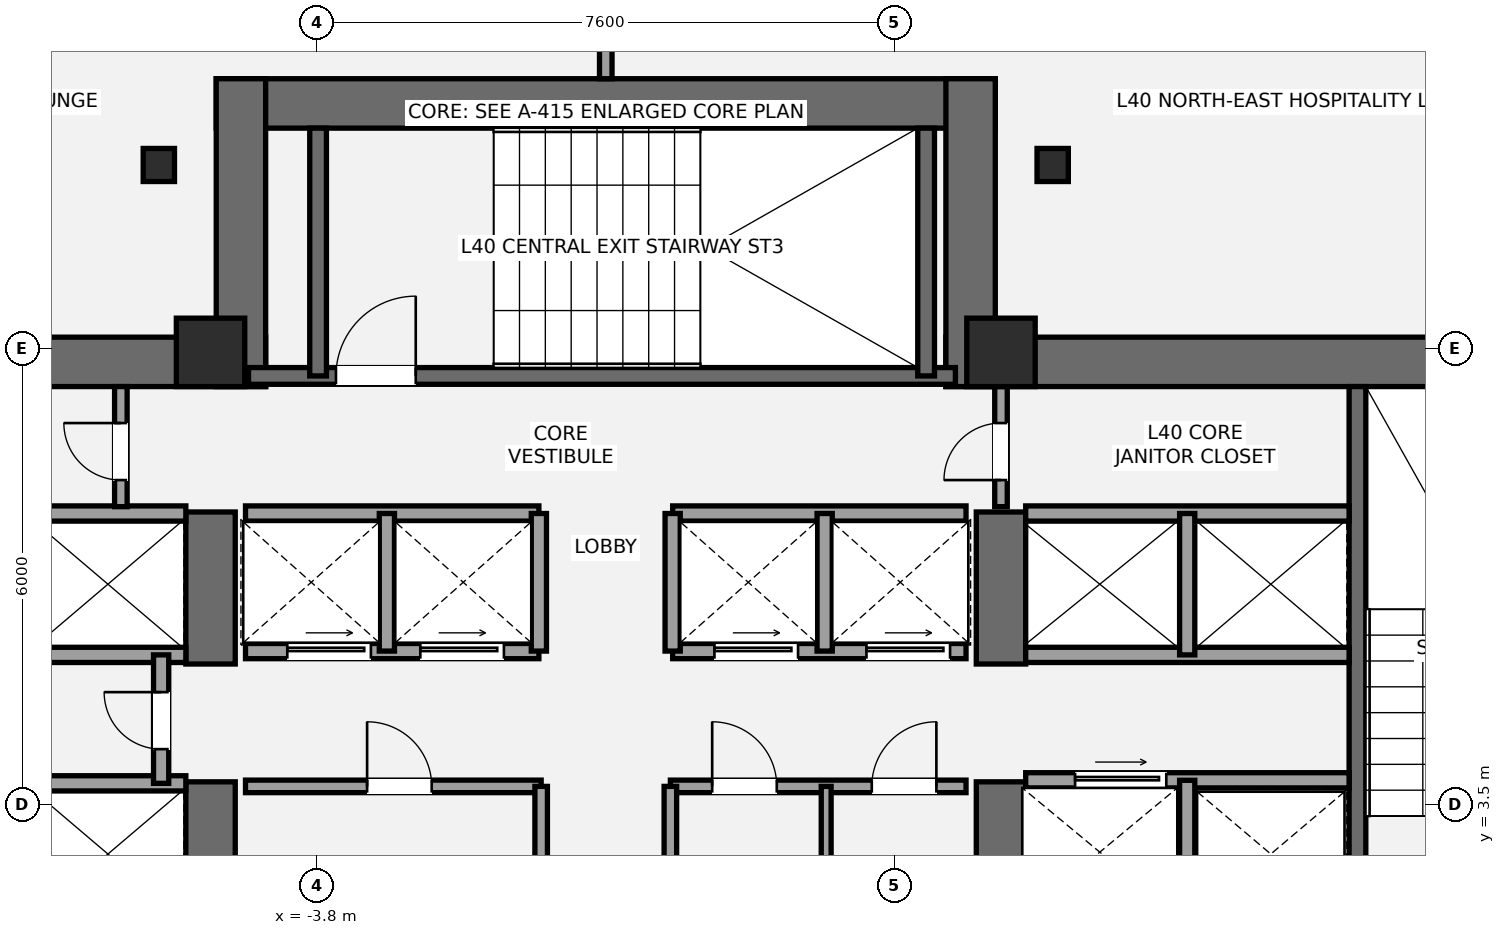
"""IFC4 building model, lengths in metres.
Left out: names, types, materials, properties, quantities, classifications, styles, units other than length and angle.
Written with IfcOpenShell. Run it as: python <this file> out.ifc"""

import sys

from ifc_helpers import new_model, si_unit, direction, frame, frame_2d, origin, origin_2d, place, context, subcontext, project, spatial, rectangle, i_section, extrude, element, fill, save


model = new_model("IFC4")
c1 = context("Model", 3, precision=1e-05, world=origin(), true_north=direction((0.0, 1.0)))
c2 = subcontext(c1, "Body", "Model", "MODEL_VIEW")
j1 = project(units=[si_unit("LENGTHUNIT", "METRE"), si_unit("PLANEANGLEUNIT", "RADIAN")], contexts=[c1])
p1 = place(None, origin())
s1 = spatial("IfcSite", under=j1, at=p1, CompositionType="ELEMENT")
p2 = place(p1, origin())
s2 = spatial("IfcBuilding", under=s1, at=p2, CompositionType="ELEMENT")
p3 = place(p2, frame((0.0, 0.0, 150.2)))
s3 = spatial("IfcBuildingStorey", under=s2, at=p3, CompositionType="ELEMENT", Elevation=150.2)
p4 = place(p3, frame((-13.8, 9.325, 0.0), z_axis=(0.0, 0.0, 1.0), x_axis=(1.0, 0.0, 0.0)))
e1 = element("IfcWall", 1, at=p4, inside=s3, PredefinedType="SHEAR", context=c2, shape_type="SweptSolid", body=[
    extrude(rectangle(XDim=9.325, YDim=0.65, at=frame_2d((4.663, 0.0))), origin(), (0.0, 0.0, 1.0), 3.2),
])
p5 = place(p3, frame((-5.2, 1.2, 0.0), z_axis=(0.0, 0.0, 1.0), x_axis=(0.0, 1.0, 0.0)))
e2 = element("IfcWall", 2, at=p5, inside=s3, PredefinedType="SHEAR", context=c2, shape_type="SweptSolid", body=[
    extrude(rectangle(XDim=2.6, YDim=0.65, at=frame_2d((1.3, 0.0))), origin(), (0.0, 0.0, 1.0), 3.2),
])
p6 = place(p3, frame((-5.2, 5.35, 0.0), z_axis=(0.0, 0.0, 1.0), x_axis=(0.0, 1.0, 0.0)))
e3 = element("IfcWall", 3, at=p6, inside=s3, PredefinedType="SHEAR", context=c2, shape_type="SweptSolid", body=[
    extrude(rectangle(XDim=2.0, YDim=0.65, at=frame_2d((1.0, 0.0))), origin(), (0.0, 0.0, 1.0), 3.2),
])
p7 = place(p3, frame((4.475, 9.325, 0.0), z_axis=(0.0, 0.0, 1.0), x_axis=(1.0, 0.0, 0.0)))
e4 = element("IfcWall", 4, at=p7, inside=s3, PredefinedType="SHEAR", context=c2, shape_type="SweptSolid", body=[
    extrude(rectangle(XDim=9.325, YDim=0.65, at=frame_2d((4.663, 0.0))), origin(), (0.0, 0.0, 1.0), 3.2),
])
p8 = place(p3, frame((5.2, 1.2, 0.0), z_axis=(0.0, 0.0, 1.0), x_axis=(0.0, 1.0, 0.0)))
e5 = element("IfcWall", 5, at=p8, inside=s3, PredefinedType="SHEAR", context=c2, shape_type="SweptSolid", body=[
    extrude(rectangle(XDim=2.6, YDim=0.65, at=frame_2d((1.3, 0.0))), origin(), (0.0, 0.0, 1.0), 3.2),
])
p9 = place(p3, frame((5.2, 5.35, 0.0), z_axis=(0.0, 0.0, 1.0), x_axis=(0.0, 1.0, 0.0)))
e6 = element("IfcWall", 6, at=p9, inside=s3, PredefinedType="SHEAR", context=c2, shape_type="SweptSolid", body=[
    extrude(rectangle(XDim=2.0, YDim=0.65, at=frame_2d((1.0, 0.0))), origin(), (0.0, 0.0, 1.0), 3.2),
])
p10 = place(p3, frame((9.89, 1.85, 0.0), z_axis=(0.0, 0.0, 1.0), x_axis=(0.0, 1.0, 0.0)))
e7 = element("IfcWall", 7, at=p10, inside=s3, PredefinedType="SHEAR", context=c2, shape_type="SweptSolid", body=[
    extrude(rectangle(XDim=7.15, YDim=0.22, at=frame_2d((3.575, 0.0))), origin(), (0.0, 0.0, 1.0), 3.2),
])
p11 = place(p3, frame((-5.125, 12.725, 0.0), z_axis=(0.0, 0.0, 1.0), x_axis=(1.0, 0.0, 0.0)))
e8 = element("IfcWall", 8, at=p11, inside=s3, PredefinedType="SHEAR", context=c2, shape_type="SweptSolid", body=[
    extrude(rectangle(XDim=10.25, YDim=0.65, at=frame_2d((5.125, 0.0))), origin(), (0.0, 0.0, 1.0), 3.2),
])
for number, where, z_axis, x_axis in (
    (9, (-4.8, 9.0, 0.0), (0.0, 0.0, 1.0), (0.0, 1.0, 0.0)),
    (10, (4.8, 9.0, 0.0), (0.0, 0.0, 1.0), (0.0, 1.0, 0.0)),
):
    element("IfcWall", number, at=place(p3, frame(where, z_axis=z_axis, x_axis=x_axis)), inside=s3, PredefinedType="SHEAR", context=c2, shape_type="SweptSolid", body=[
        extrude(rectangle(XDim=4.05, YDim=0.65, at=frame_2d((2.025, 0.0))), origin(), (0.0, 0.0, 1.0), 3.2),
    ])
p12 = place(p3, frame((-4.7, 9.14, 0.0), z_axis=(0.0, 0.0, 1.0), x_axis=(1.0, 0.0, 0.0)))
e11 = element("IfcWall", 11, at=p12, inside=s3, PredefinedType="SHEAR", context=c2, shape_type="SweptSolid", body=[
    extrude(rectangle(XDim=9.3, YDim=0.22, at=frame_2d((4.65, 0.0))), origin(), (0.0, 0.0, 1.0), 3.2),
])
p13 = place(p12, frame((1.15, 0.0, 0.0)))
e12 = element("IfcOpeningElement", 12, at=p13, cuts=e11, PredefinedType="OPENING", context=c2, shape_type="SweptSolid", body=[
    extrude(rectangle(XDim=1.05, YDim=2.15, at=frame_2d((0.525, 1.075))), frame((0.0, 0.12, 0.0), z_axis=(0.0, -1.0, 0.0), x_axis=(1.0, 0.0, 0.0)), (0.0, 0.0, 1.0), 0.24),
])
for number, where, z_axis, x_axis in (
    (13, (-3.785, 9.14, 0.0), (0.0, 0.0, 1.0), (0.0, 1.0, 0.0)),
    (14, (4.215, 9.14, 0.0), (0.0, 0.0, 1.0), (0.0, 1.0, 0.0)),
):
    element("IfcWall", number, at=place(p3, frame(where, z_axis=z_axis, x_axis=x_axis)), inside=s3, PredefinedType="SHEAR", context=c2, shape_type="SweptSolid", body=[
        extrude(rectangle(XDim=3.26, YDim=0.22, at=frame_2d((1.63, 0.0))), origin(), (0.0, 0.0, 1.0), 3.2),
    ])
for number, where, z_axis, x_axis in (
    (15, (-5.2, 9.45, 0.0), (0.0, 0.0, 1.0), (1.0, 0.0, 0.0)),
    (16, (5.2, 9.45, 0.0), (0.0, 0.0, 1.0), (1.0, 0.0, 0.0)),
):
    element("IfcColumn", number, at=place(p3, frame(where, z_axis=z_axis, x_axis=x_axis)), inside=s3, PredefinedType="COLUMN", context=c2, shape_type="SweptSolid", body=[
        extrude(rectangle(XDim=0.9, YDim=0.9, at=origin_2d()), origin(), (0.0, 0.0, 1.0), 3.2),
    ])
for number, where, z_axis, x_axis in (
    (17, (5.88, 11.915, 0.0), (0.0, 0.0, 1.0), (1.0, 0.0, 0.0)),
    (18, (-5.88, 11.915, 0.0), (0.0, 0.0, 1.0), (1.0, 0.0, 0.0)),
):
    element("IfcColumn", number, at=place(p3, frame(where, z_axis=z_axis, x_axis=x_axis)), inside=s3, PredefinedType="COLUMN", context=c2, shape_type="SweptSolid", body=[
        extrude(i_section(OverallWidth=0.412, OverallDepth=0.435, WebThickness=0.036, FlangeThickness=0.057, at=origin_2d()), origin(), (0.0, 0.0, 1.0), 3.2),
    ])
for number, where, z_axis, x_axis in (
    (19, (-9.78, 3.78, 0.0), (0.0, 0.0, 1.0), (1.0, 0.0, 0.0)),
    (20, (-9.78, 5.47, 0.0), (0.0, 0.0, 1.0), (1.0, 0.0, 0.0)),
    (21, (-9.78, 7.33, 0.0), (0.0, 0.0, 1.0), (1.0, 0.0, 0.0)),
):
    element("IfcWall", number, at=place(p3, frame(where, z_axis=z_axis, x_axis=x_axis)), inside=s3, PredefinedType="SOLIDWALL", context=c2, shape_type="SweptSolid", body=[
        extrude(rectangle(XDim=4.255, YDim=0.2, at=frame_2d((2.127, 0.0))), origin(), (0.0, 0.0, 1.0), 3.02),
    ])
p14 = place(p3, frame((-5.85, 3.78, 0.0), z_axis=(0.0, 0.0, 1.0), x_axis=(0.0, 1.0, 0.0)))
e22 = element("IfcWall", 22, at=p14, inside=s3, PredefinedType="SOLIDWALL", context=c2, shape_type="SweptSolid", body=[
    extrude(rectangle(XDim=1.69, YDim=0.2, at=frame_2d((0.845, 0.0))), origin(), (0.0, 0.0, 1.0), 3.02),
])
p15 = place(p14, frame((0.45, 0.0, 0.0)))
e23 = element("IfcOpeningElement", 23, at=p15, cuts=e22, PredefinedType="OPENING", context=c2, shape_type="SweptSolid", body=[
    extrude(rectangle(XDim=0.75, YDim=2.1, at=frame_2d((0.375, 1.05))), frame((0.0, 0.11, 0.0), z_axis=(0.0, -1.0, 0.0), x_axis=(1.0, 0.0, 0.0)), (0.0, 0.0, 1.0), 0.22),
])
p16 = place(p3, frame((5.525, 3.82, 0.0), z_axis=(0.0, 0.0, 1.0), x_axis=(1.0, 0.0, 0.0)))
e24 = element("IfcWall", 24, at=p16, inside=s3, PredefinedType="SOLIDWALL", context=c2, shape_type="SweptSolid", body=[
    extrude(rectangle(XDim=4.255, YDim=0.2, at=frame_2d((2.127, 0.0))), origin(), (0.0, 0.0, 1.0), 3.02),
])
p17 = place(p16, frame((0.65, 0.0, 0.0)))
e25 = element("IfcOpeningElement", 25, at=p17, cuts=e24, PredefinedType="OPENING", context=c2, shape_type="SweptSolid", body=[
    extrude(rectangle(XDim=1.2, YDim=2.2, at=frame_2d((0.6, 1.1))), frame((0.0, 0.11, 0.0), z_axis=(0.0, -1.0, 0.0), x_axis=(1.0, 0.0, 0.0)), (0.0, 0.0, 1.0), 0.22),
])
p18 = place(p3, frame((7.65, 1.85, 0.0), z_axis=(0.0, 0.0, 1.0), x_axis=(0.0, 1.0, 0.0)))
e26 = element("IfcWall", 26, at=p18, inside=s3, PredefinedType="SOLIDWALL", context=c2, shape_type="SweptSolid", body=[
    extrude(rectangle(XDim=1.97, YDim=0.2, at=frame_2d((0.985, 0.0))), origin(), (0.0, 0.0, 1.0), 3.02),
])
for number, where, z_axis, x_axis in (
    (27, (5.525, 5.47, 0.0), (0.0, 0.0, 1.0), (1.0, 0.0, 0.0)),
    (28, (5.525, 7.33, 0.0), (0.0, 0.0, 1.0), (1.0, 0.0, 0.0)),
):
    element("IfcWall", number, at=place(p3, frame(where, z_axis=z_axis, x_axis=x_axis)), inside=s3, PredefinedType="SOLIDWALL", context=c2, shape_type="SweptSolid", body=[
        extrude(rectangle(XDim=4.255, YDim=0.2, at=frame_2d((2.127, 0.0))), origin(), (0.0, 0.0, 1.0), 3.02),
    ])
p19 = place(p3, frame((7.65, 5.47, 0.0), z_axis=(0.0, 0.0, 1.0), x_axis=(0.0, 1.0, 0.0)))
e29 = element("IfcWall", 29, at=p19, inside=s3, PredefinedType="SOLIDWALL", context=c2, shape_type="SweptSolid", body=[
    extrude(rectangle(XDim=1.86, YDim=0.2, at=frame_2d((0.93, 0.0))), origin(), (0.0, 0.0, 1.0), 3.02),
])
p20 = place(p3, frame((-4.74, 3.74, 0.0), z_axis=(0.0, 0.0, 1.0), x_axis=(1.0, 0.0, 0.0)))
e30 = element("IfcWall", 30, at=p20, inside=s3, PredefinedType="PARTITIONING", context=c2, shape_type="SweptSolid", body=[
    extrude(rectangle(XDim=3.89, YDim=0.165, at=frame_2d((1.945, 0.0))), origin(), (0.0, 0.0, 1.0), 3.02),
])
p21 = place(p20, frame((1.6, 0.0, 0.0)))
e31 = element("IfcOpeningElement", 31, at=p21, cuts=e30, PredefinedType="OPENING", context=c2, shape_type="SweptSolid", body=[
    extrude(rectangle(XDim=0.85, YDim=2.1, at=frame_2d((0.425, 1.05))), frame((0.0, 0.093, 0.0), z_axis=(0.0, -1.0, 0.0), x_axis=(1.0, 0.0, 0.0)), (0.0, 0.0, 1.0), 0.185),
])
p22 = place(p3, frame((-0.85, 1.92, 0.0), z_axis=(0.0, 0.0, 1.0), x_axis=(0.0, 1.0, 0.0)))
e32 = element("IfcWall", 32, at=p22, inside=s3, PredefinedType="PARTITIONING", context=c2, shape_type="SweptSolid", body=[
    extrude(rectangle(XDim=1.82, YDim=0.165, at=frame_2d((0.91, 0.0))), origin(), (0.0, 0.0, 1.0), 3.02),
])
p23 = place(p3, frame((0.85, 3.74, 0.0), z_axis=(0.0, 0.0, 1.0), x_axis=(1.0, 0.0, 0.0)))
e33 = element("IfcWall", 33, at=p23, inside=s3, PredefinedType="PARTITIONING", context=c2, shape_type="SweptSolid", body=[
    extrude(rectangle(XDim=3.89, YDim=0.165, at=frame_2d((1.945, 0.0))), origin(), (0.0, 0.0, 1.0), 3.02),
])
p24 = place(p23, frame((0.55, 0.0, 0.0)))
e34 = element("IfcOpeningElement", 34, at=p24, cuts=e33, PredefinedType="OPENING", context=c2, shape_type="SweptSolid", body=[
    extrude(rectangle(XDim=0.85, YDim=2.1, at=frame_2d((0.425, 1.05))), frame((0.0, 0.093, 0.0), z_axis=(0.0, -1.0, 0.0), x_axis=(1.0, 0.0, 0.0)), (0.0, 0.0, 1.0), 0.185),
])
p25 = place(p23, frame((2.65, 0.0, 0.0)))
e35 = element("IfcOpeningElement", 35, at=p25, cuts=e33, PredefinedType="OPENING", context=c2, shape_type="SweptSolid", body=[
    extrude(rectangle(XDim=0.85, YDim=2.1, at=frame_2d((0.425, 1.05))), frame((0.0, 0.093, 0.0), z_axis=(0.0, -1.0, 0.0), x_axis=(1.0, 0.0, 0.0)), (0.0, 0.0, 1.0), 0.185),
])
p26 = place(p3, frame((0.85, 1.92, 0.0), z_axis=(0.0, 0.0, 1.0), x_axis=(0.0, 1.0, 0.0)))
e36 = element("IfcWall", 36, at=p26, inside=s3, PredefinedType="PARTITIONING", context=c2, shape_type="SweptSolid", body=[
    extrude(rectangle(XDim=1.82, YDim=0.165, at=frame_2d((0.91, 0.0))), origin(), (0.0, 0.0, 1.0), 3.02),
])
p27 = place(p3, frame((2.9, 1.92, 0.0), z_axis=(0.0, 0.0, 1.0), x_axis=(0.0, 1.0, 0.0)))
e37 = element("IfcWall", 37, at=p27, inside=s3, PredefinedType="PARTITIONING", context=c2, shape_type="SweptSolid", body=[
    extrude(rectangle(XDim=1.82, YDim=0.13, at=frame_2d((0.91, 0.0))), origin(), (0.0, 0.0, 1.0), 3.02),
])
p28 = place(p3, frame((-4.74, 5.52, 0.0), z_axis=(0.0, 0.0, 1.0), x_axis=(1.0, 0.0, 0.0)))
e38 = element("IfcWall", 38, at=p28, inside=s3, PredefinedType="SOLIDWALL", context=c2, shape_type="SweptSolid", body=[
    extrude(rectangle(XDim=3.86, YDim=0.2, at=frame_2d((1.93, 0.0))), origin(), (0.0, 0.0, 1.0), 3.02),
])
p29 = place(p28, frame((0.55, 0.0, 0.0)))
e39 = element("IfcOpeningElement", 39, at=p29, cuts=e38, PredefinedType="OPENING", context=c2, shape_type="SweptSolid", body=[
    extrude(rectangle(XDim=1.1, YDim=2.2, at=frame_2d((0.55, 1.1))), frame((0.0, 0.11, 0.0), z_axis=(0.0, -1.0, 0.0), x_axis=(1.0, 0.0, 0.0)), (0.0, 0.0, 1.0), 0.22),
])
p30 = place(p28, frame((2.3, 0.0, 0.0)))
e40 = element("IfcOpeningElement", 40, at=p30, cuts=e38, PredefinedType="OPENING", context=c2, shape_type="SweptSolid", body=[
    extrude(rectangle(XDim=1.1, YDim=2.2, at=frame_2d((0.55, 1.1))), frame((0.0, 0.11, 0.0), z_axis=(0.0, -1.0, 0.0), x_axis=(1.0, 0.0, 0.0)), (0.0, 0.0, 1.0), 0.22),
])
p31 = place(p3, frame((0.88, 5.52, 0.0), z_axis=(0.0, 0.0, 1.0), x_axis=(1.0, 0.0, 0.0)))
e41 = element("IfcWall", 41, at=p31, inside=s3, PredefinedType="SOLIDWALL", context=c2, shape_type="SweptSolid", body=[
    extrude(rectangle(XDim=3.86, YDim=0.2, at=frame_2d((1.93, 0.0))), origin(), (0.0, 0.0, 1.0), 3.02),
])
p32 = place(p31, frame((0.55, 0.0, 0.0)))
e42 = element("IfcOpeningElement", 42, at=p32, cuts=e41, PredefinedType="OPENING", context=c2, shape_type="SweptSolid", body=[
    extrude(rectangle(XDim=1.1, YDim=2.2, at=frame_2d((0.55, 1.1))), frame((0.0, 0.11, 0.0), z_axis=(0.0, -1.0, 0.0), x_axis=(1.0, 0.0, 0.0)), (0.0, 0.0, 1.0), 0.22),
])
p33 = place(p31, frame((2.55, 0.0, 0.0)))
e43 = element("IfcOpeningElement", 43, at=p33, cuts=e41, PredefinedType="OPENING", context=c2, shape_type="SweptSolid", body=[
    extrude(rectangle(XDim=1.1, YDim=2.2, at=frame_2d((0.55, 1.1))), frame((0.0, 0.11, 0.0), z_axis=(0.0, -1.0, 0.0), x_axis=(1.0, 0.0, 0.0)), (0.0, 0.0, 1.0), 0.22),
])
for number, where, z_axis, x_axis in (
    (44, (-4.74, 7.33, 0.0), (0.0, 0.0, 1.0), (1.0, 0.0, 0.0)),
    (45, (0.88, 7.33, 0.0), (0.0, 0.0, 1.0), (1.0, 0.0, 0.0)),
):
    element("IfcWall", number, at=place(p3, frame(where, z_axis=z_axis, x_axis=x_axis)), inside=s3, PredefinedType="SOLIDWALL", context=c2, shape_type="SweptSolid", body=[
        extrude(rectangle(XDim=3.86, YDim=0.2, at=frame_2d((1.93, 0.0))), origin(), (0.0, 0.0, 1.0), 3.02),
    ])
for number, where, z_axis, x_axis in (
    (46, (-2.88, 5.52, 0.0), (0.0, 0.0, 1.0), (0.0, 1.0, 0.0)),
    (47, (2.88, 5.52, 0.0), (0.0, 0.0, 1.0), (0.0, 1.0, 0.0)),
    (48, (-0.88, 5.52, 0.0), (0.0, 0.0, 1.0), (0.0, 1.0, 0.0)),
    (49, (0.88, 5.52, 0.0), (0.0, 0.0, 1.0), (0.0, 1.0, 0.0)),
):
    element("IfcWall", number, at=place(p3, frame(where, z_axis=z_axis, x_axis=x_axis)), inside=s3, PredefinedType="SOLIDWALL", context=c2, shape_type="SweptSolid", body=[
        extrude(rectangle(XDim=1.81, YDim=0.2, at=frame_2d((0.905, 0.0))), origin(), (0.0, 0.0, 1.0), 3.02),
    ])
p34 = place(p3, frame((-6.38, 7.42, 0.0), z_axis=(0.0, 0.0, 1.0), x_axis=(0.0, 1.0, 0.0)))
e50 = element("IfcWall", 50, at=p34, inside=s3, PredefinedType="PARTITIONING", context=c2, shape_type="SweptSolid", body=[
    extrude(rectangle(XDim=1.58, YDim=0.165, at=frame_2d((0.79, 0.0))), origin(), (0.0, 0.0, 1.0), 3.02),
])
p35 = place(p34, frame((0.35, 0.0, 0.0)))
e51 = element("IfcOpeningElement", 51, at=p35, cuts=e50, PredefinedType="OPENING", context=c2, shape_type="SweptSolid", body=[
    extrude(rectangle(XDim=0.75, YDim=2.1, at=frame_2d((0.375, 1.05))), frame((0.0, 0.093, 0.0), z_axis=(0.0, -1.0, 0.0), x_axis=(1.0, 0.0, 0.0)), (0.0, 0.0, 1.0), 0.185),
])
p36 = place(p3, frame((5.2, 7.42, 0.0), z_axis=(0.0, 0.0, 1.0), x_axis=(0.0, 1.0, 0.0)))
e52 = element("IfcWall", 52, at=p36, inside=s3, PredefinedType="PARTITIONING", context=c2, shape_type="SweptSolid", body=[
    extrude(rectangle(XDim=1.58, YDim=0.165, at=frame_2d((0.79, 0.0))), origin(), (0.0, 0.0, 1.0), 3.02),
])
p37 = place(p36, frame((0.35, 0.0, 0.0)))
e53 = element("IfcOpeningElement", 53, at=p37, cuts=e52, PredefinedType="OPENING", context=c2, shape_type="SweptSolid", body=[
    extrude(rectangle(XDim=0.75, YDim=2.1, at=frame_2d((0.375, 1.05))), frame((0.0, 0.093, 0.0), z_axis=(0.0, -1.0, 0.0), x_axis=(1.0, 0.0, 0.0)), (0.0, 0.0, 1.0), 0.185),
])
p38 = place(p3, frame((0.0, 13.05, 0.0), z_axis=(0.0, 0.0, 1.0), x_axis=(0.0, 1.0, 0.0)))
e54 = element("IfcWall", 54, at=p38, inside=s3, PredefinedType="PARTITIONING", context=c2, shape_type="SweptSolid", body=[
    extrude(rectangle(XDim=3.229, YDim=0.165, at=frame_2d((1.614, 0.0))), origin(), (0.0, 0.0, 1.0), 3.02),
])
p39 = place(p13, origin())
e55 = element("IfcDoor", 55, at=p39, inside=s3, OperationType="SINGLE_SWING_RIGHT", PredefinedType="DOOR", context=c2, shape_type="SweptSolid", body=[
    extrude(rectangle(XDim=1.05, YDim=2.15, at=frame_2d((0.525, 1.075))), frame((0.0, 0.025, 0.0), z_axis=(0.0, -1.0, 0.0), x_axis=(1.0, 0.0, 0.0)), (0.0, 0.0, 1.0), 0.05),
])
fill(e12, e55)
p40 = place(p15, origin())
e56 = element("IfcDoor", 56, at=p40, inside=s3, OperationType="SINGLE_SWING_RIGHT", PredefinedType="DOOR", context=c2, shape_type="SweptSolid", body=[
    extrude(rectangle(XDim=0.75, YDim=2.1, at=frame_2d((0.375, 1.05))), frame((0.0, 0.025, 0.0), z_axis=(0.0, -1.0, 0.0), x_axis=(1.0, 0.0, 0.0)), (0.0, 0.0, 1.0), 0.05),
])
fill(e23, e56)
p41 = place(p17, origin())
e57 = element("IfcDoor", 57, at=p41, inside=s3, OperationType="SLIDING_TO_RIGHT", PredefinedType="DOOR", context=c2, shape_type="SweptSolid", body=[
    extrude(rectangle(XDim=1.2, YDim=2.2, at=frame_2d((0.6, 1.1))), frame((0.0, 0.025, 0.0), z_axis=(0.0, -1.0, 0.0), x_axis=(1.0, 0.0, 0.0)), (0.0, 0.0, 1.0), 0.05),
])
fill(e25, e57)
p42 = place(p21, origin())
e58 = element("IfcDoor", 58, at=p42, inside=s3, OperationType="SINGLE_SWING_LEFT", PredefinedType="DOOR", context=c2, shape_type="SweptSolid", body=[
    extrude(rectangle(XDim=0.85, YDim=2.1, at=frame_2d((0.425, 1.05))), frame((0.0, 0.025, 0.0), z_axis=(0.0, -1.0, 0.0), x_axis=(1.0, 0.0, 0.0)), (0.0, 0.0, 1.0), 0.05),
])
fill(e31, e58)
p43 = place(p24, origin())
e59 = element("IfcDoor", 59, at=p43, inside=s3, OperationType="SINGLE_SWING_LEFT", PredefinedType="DOOR", context=c2, shape_type="SweptSolid", body=[
    extrude(rectangle(XDim=0.85, YDim=2.1, at=frame_2d((0.425, 1.05))), frame((0.0, 0.025, 0.0), z_axis=(0.0, -1.0, 0.0), x_axis=(1.0, 0.0, 0.0)), (0.0, 0.0, 1.0), 0.05),
])
fill(e34, e59)
p44 = place(p25, origin())
e60 = element("IfcDoor", 60, at=p44, inside=s3, OperationType="SINGLE_SWING_RIGHT", PredefinedType="DOOR", context=c2, shape_type="SweptSolid", body=[
    extrude(rectangle(XDim=0.85, YDim=2.1, at=frame_2d((0.425, 1.05))), frame((0.0, 0.025, 0.0), z_axis=(0.0, -1.0, 0.0), x_axis=(1.0, 0.0, 0.0)), (0.0, 0.0, 1.0), 0.05),
])
fill(e35, e60)
p45 = place(p29, origin())
e61 = element("IfcDoor", 61, at=p45, inside=s3, OperationType="SLIDING_TO_LEFT", PredefinedType="DOOR", context=c2, shape_type="SweptSolid", body=[
    extrude(rectangle(XDim=1.1, YDim=2.2, at=frame_2d((0.55, 1.1))), frame((0.0, 0.025, 0.0), z_axis=(0.0, -1.0, 0.0), x_axis=(1.0, 0.0, 0.0)), (0.0, 0.0, 1.0), 0.05),
])
fill(e39, e61)
p46 = place(p30, origin())
e62 = element("IfcDoor", 62, at=p46, inside=s3, OperationType="SLIDING_TO_LEFT", PredefinedType="DOOR", context=c2, shape_type="SweptSolid", body=[
    extrude(rectangle(XDim=1.1, YDim=2.2, at=frame_2d((0.55, 1.1))), frame((0.0, 0.025, 0.0), z_axis=(0.0, -1.0, 0.0), x_axis=(1.0, 0.0, 0.0)), (0.0, 0.0, 1.0), 0.05),
])
fill(e40, e62)
p47 = place(p32, origin())
e63 = element("IfcDoor", 63, at=p47, inside=s3, OperationType="SLIDING_TO_LEFT", PredefinedType="DOOR", context=c2, shape_type="SweptSolid", body=[
    extrude(rectangle(XDim=1.1, YDim=2.2, at=frame_2d((0.55, 1.1))), frame((0.0, 0.025, 0.0), z_axis=(0.0, -1.0, 0.0), x_axis=(1.0, 0.0, 0.0)), (0.0, 0.0, 1.0), 0.05),
])
fill(e42, e63)
p48 = place(p33, origin())
e64 = element("IfcDoor", 64, at=p48, inside=s3, OperationType="SLIDING_TO_LEFT", PredefinedType="DOOR", context=c2, shape_type="SweptSolid", body=[
    extrude(rectangle(XDim=1.1, YDim=2.2, at=frame_2d((0.55, 1.1))), frame((0.0, 0.025, 0.0), z_axis=(0.0, -1.0, 0.0), x_axis=(1.0, 0.0, 0.0)), (0.0, 0.0, 1.0), 0.05),
])
fill(e43, e64)
p49 = place(p35, origin())
e65 = element("IfcDoor", 65, at=p49, inside=s3, OperationType="SINGLE_SWING_RIGHT", PredefinedType="DOOR", context=c2, shape_type="SweptSolid", body=[
    extrude(rectangle(XDim=0.75, YDim=2.1, at=frame_2d((0.375, 1.05))), frame((0.0, 0.025, 0.0), z_axis=(0.0, -1.0, 0.0), x_axis=(1.0, 0.0, 0.0)), (0.0, 0.0, 1.0), 0.05),
])
fill(e51, e65)
p50 = place(p37, origin())
e66 = element("IfcDoor", 66, at=p50, inside=s3, OperationType="SINGLE_SWING_LEFT", PredefinedType="DOOR", context=c2, shape_type="SweptSolid", body=[
    extrude(rectangle(XDim=0.75, YDim=2.1, at=frame_2d((0.375, 1.05))), frame((0.0, 0.025, 0.0), z_axis=(0.0, -1.0, 0.0), x_axis=(1.0, 0.0, 0.0)), (0.0, 0.0, 1.0), 0.05),
])
fill(e53, e66)
save(model, sys.argv[1])
